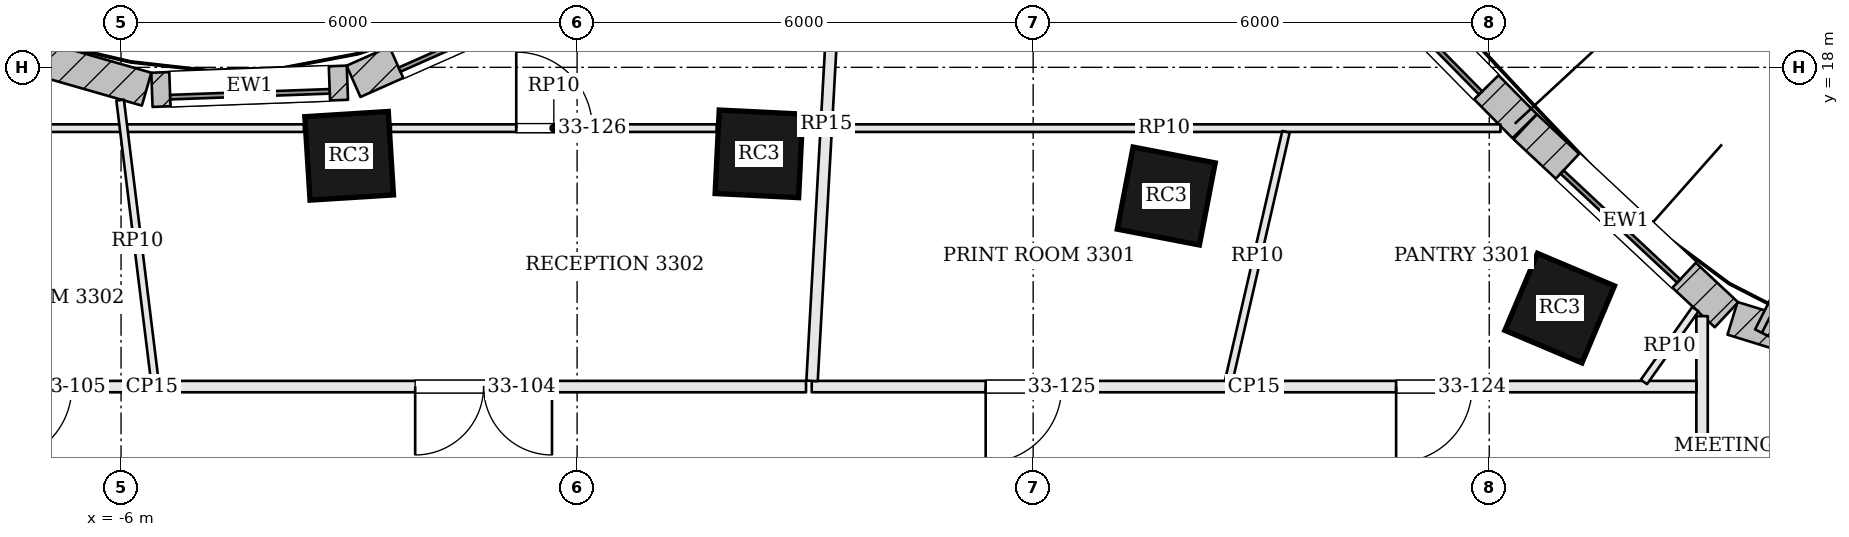
"""IFC4 building model, lengths in metres.
Left out: names, types, materials, properties, quantities, classifications, styles, units other than length and angle.
Written with IfcOpenShell. Run it as: python <this file> out.ifc"""

import sys

from ifc_helpers import new_model, si_unit, direction, frame, frame_2d, origin, origin_2d, place, context, subcontext, project, spatial, rectangle, extrude, element, fill, save


model = new_model("IFC4")
c1 = context("Model", 3, precision=1e-05, world=origin(), true_north=direction((0.0, 1.0)))
c2 = subcontext(c1, "Body", "Model", "MODEL_VIEW")
j1 = project(units=[si_unit("LENGTHUNIT", "METRE"), si_unit("PLANEANGLEUNIT", "RADIAN")], contexts=[c1])
p1 = place(None, origin())
s1 = spatial("IfcSite", under=j1, at=p1, CompositionType="ELEMENT")
p2 = place(p1, origin())
s2 = spatial("IfcBuilding", under=s1, at=p2, CompositionType="ELEMENT")
p3 = place(p2, frame((0.0, 0.0, 138.3)))
s3 = spatial("IfcBuildingStorey", under=s2, at=p3, CompositionType="ELEMENT", Elevation=138.3)
for number, where, z_axis, x_axis in (
    (1, (12.927, 14.832, 0.0), (0.0, 0.0, 1.0), (-0.921, 0.389, 0.0)),
    (2, (7.751, 16.307, 0.0), (0.0, 0.0, 1.0), (-0.982, 0.189, 0.0)),
    (3, (2.392, 16.862, 0.0), (0.0, 0.0, 1.0), (-0.999, 0.049, 0.0)),
    (4, (-2.999, 16.836, 0.0), (0.0, 0.0, 1.0), (-0.998, -0.062, 0.0)),
):
    element("IfcColumn", number, at=place(p3, frame(where, z_axis=z_axis, x_axis=x_axis)), inside=s3, PredefinedType="COLUMN", context=c2, shape_type="SweptSolid", body=[
        extrude(rectangle(XDim=1.1, YDim=1.1, at=origin_2d()), origin(), (0.0, 0.0, 1.0), 3.9),
    ])
p4 = place(p3, frame((18.958, 13.542, 0.0), z_axis=(0.0, 0.0, 1.0), x_axis=(-0.955792437529, 0.294042201668, 0.0)))
e5 = element("IfcWall", 5, at=p4, inside=s3, PredefinedType="SOLIDWALL", context=c2, shape_type="SweptSolid", body=[
    extrude(rectangle(XDim=3.931, YDim=0.45, at=frame_2d((1.965, 0.0))), origin(), (0.0, 0.0, 1.0), 3.7),
])
p5 = place(p4, frame((0.915, 0.0, 0.9)))
e6 = element("IfcOpeningElement", 6, at=p5, cuts=e5, PredefinedType="OPENING", context=c2, shape_type="SweptSolid", body=[
    extrude(rectangle(XDim=2.1, YDim=2.3, at=frame_2d((1.05, 1.15))), frame((0.0, 0.235, 0.0), z_axis=(0.0, -1.0, 0.0), x_axis=(1.0, 0.0, 0.0)), (0.0, 0.0, 1.0), 0.47),
])
p6 = place(p3, frame((15.121, 14.745, 0.0), z_axis=(0.0, 0.0, 1.0), x_axis=(-0.730618259172, 0.68278617397, 0.0)))
e7 = element("IfcWall", 7, at=p6, inside=s3, PredefinedType="SOLIDWALL", context=c2, shape_type="SweptSolid", body=[
    extrude(rectangle(XDim=3.624, YDim=0.45, at=frame_2d((1.812, 0.0))), origin(), (0.0, 0.0, 1.0), 3.7),
])
p7 = place(p6, frame((0.762, 0.0, 0.9)))
e8 = element("IfcOpeningElement", 8, at=p7, cuts=e7, PredefinedType="OPENING", context=c2, shape_type="SweptSolid", body=[
    extrude(rectangle(XDim=2.1, YDim=2.3, at=frame_2d((1.05, 1.15))), frame((0.0, 0.235, 0.0), z_axis=(0.0, -1.0, 0.0), x_axis=(1.0, 0.0, 0.0)), (0.0, 0.0, 1.0), 0.47),
])
p8 = place(p3, frame((12.466, 17.226, 0.0), z_axis=(0.0, 0.0, 1.0), x_axis=(-0.701875966769, 0.712299183821, 0.0)))
e9 = element("IfcWall", 9, at=p8, inside=s3, PredefinedType="SOLIDWALL", context=c2, shape_type="SweptSolid", body=[
    extrude(rectangle(XDim=3.537, YDim=0.45, at=frame_2d((1.769, 0.0))), origin(), (0.0, 0.0, 1.0), 3.7),
])
p9 = place(p8, frame((0.718, 0.0, 0.9)))
e10 = element("IfcOpeningElement", 10, at=p9, cuts=e9, PredefinedType="OPENING", context=c2, shape_type="SweptSolid", body=[
    extrude(rectangle(XDim=2.1, YDim=2.3, at=frame_2d((1.05, 1.15))), frame((0.0, 0.235, 0.0), z_axis=(0.0, -1.0, 0.0), x_axis=(1.0, 0.0, 0.0)), (0.0, 0.0, 1.0), 0.47),
])
p10 = place(p3, frame((0.105, 19.167, 0.0), z_axis=(0.0, 0.0, 1.0), x_axis=(-0.91414046241, -0.405397601109, 0.0)))
e11 = element("IfcWall", 11, at=p10, inside=s3, PredefinedType="SOLIDWALL", context=c2, shape_type="SweptSolid", body=[
    extrude(rectangle(XDim=3.333, YDim=0.45, at=frame_2d((1.667, 0.0))), origin(), (0.0, 0.0, 1.0), 3.7),
])
p11 = place(p10, frame((0.617, 0.0, 0.9)))
e12 = element("IfcOpeningElement", 12, at=p11, cuts=e11, PredefinedType="OPENING", context=c2, shape_type="SweptSolid", body=[
    extrude(rectangle(XDim=2.1, YDim=2.3, at=frame_2d((1.05, 1.15))), frame((0.0, 0.235, 0.0), z_axis=(0.0, -1.0, 0.0), x_axis=(1.0, 0.0, 0.0)), (0.0, 0.0, 1.0), 0.47),
])
p12 = place(p3, frame((-3.022, 17.798, 0.0), z_axis=(0.0, 0.0, 1.0), x_axis=(-0.999339560591, -0.036337895349, 0.0)))
e13 = element("IfcWall", 13, at=p12, inside=s3, PredefinedType="SOLIDWALL", context=c2, shape_type="SweptSolid", body=[
    extrude(rectangle(XDim=2.573, YDim=0.45, at=frame_2d((1.287, 0.0))), origin(), (0.0, 0.0, 1.0), 3.7),
])
p13 = place(p12, frame((0.237, 0.0, 0.9)))
e14 = element("IfcOpeningElement", 14, at=p13, cuts=e13, PredefinedType="OPENING", context=c2, shape_type="SweptSolid", body=[
    extrude(rectangle(XDim=2.1, YDim=2.3, at=frame_2d((1.05, 1.15))), frame((0.0, 0.235, 0.0), z_axis=(0.0, -1.0, 0.0), x_axis=(1.0, 0.0, 0.0)), (0.0, 0.0, 1.0), 0.47),
])
p14 = place(p3, frame((-5.664, 17.713, 0.0), z_axis=(0.0, 0.0, 1.0), x_axis=(-0.961108031684, 0.276172684083, 0.0)))
e15 = element("IfcWall", 15, at=p14, inside=s3, PredefinedType="SOLIDWALL", context=c2, shape_type="SweptSolid", body=[
    extrude(rectangle(XDim=4.686, YDim=0.45, at=frame_2d((2.343, 0.0))), origin(), (0.0, 0.0, 1.0), 3.7),
])
p15 = place(p14, frame((1.443, 0.0, 0.9)))
e16 = element("IfcOpeningElement", 16, at=p15, cuts=e15, PredefinedType="OPENING", context=c2, shape_type="SweptSolid", body=[
    extrude(rectangle(XDim=1.8, YDim=2.3, at=frame_2d((0.9, 1.15))), frame((0.0, 0.235, 0.0), z_axis=(0.0, -1.0, 0.0), x_axis=(1.0, 0.0, 0.0)), (0.0, 0.0, 1.0), 0.47),
])
p16 = place(p3, frame((15.587, 14.507, 0.0), z_axis=(0.0, 0.0, 1.0), x_axis=(0.452117231361, 0.89195852432, 0.0)))
e17 = element("IfcWall", 17, at=p16, inside=s3, PredefinedType="SOLIDWALL", context=c2, shape_type="SweptSolid", body=[
    extrude(rectangle(XDim=1.75, YDim=0.2, at=frame_2d((0.875, 0.0))), origin(), (0.0, 0.0, 1.0), 3.7),
])
p17 = place(p3, frame((14.8, 3.784, 0.0), z_axis=(0.0, 0.0, 1.0), x_axis=(0.0, 1.0, 0.0)))
e18 = element("IfcWall", 18, at=p17, inside=s3, PredefinedType="PARTITIONING", context=c2, shape_type="SweptSolid", body=[
    extrude(rectangle(XDim=10.943, YDim=0.15, at=frame_2d((5.472, 0.0))), origin(), (0.0, 0.0, 1.0), 3.198),
])
p18 = place(p17, frame((1.387, 0.0, 0.0)))
e19 = element("IfcOpeningElement", 19, at=p18, cuts=e18, PredefinedType="OPENING", context=c2, shape_type="SweptSolid", body=[
    extrude(rectangle(XDim=1.8, YDim=2.1, at=frame_2d((0.9, 1.05))), frame((0.0, 0.085, 0.0), z_axis=(0.0, -1.0, 0.0), x_axis=(1.0, 0.0, 0.0)), (0.0, 0.0, 1.0), 0.17),
])
p19 = place(p17, frame((7.199, 0.0, 0.0)))
e20 = element("IfcOpeningElement", 20, at=p19, cuts=e18, PredefinedType="OPENING", context=c2, shape_type="SweptSolid", body=[
    extrude(rectangle(XDim=1.0, YDim=2.4, at=frame_2d((0.5, 1.2))), frame((0.0, 0.085, 0.0), z_axis=(0.0, -1.0, 0.0), x_axis=(1.0, 0.0, 0.0)), (0.0, 0.0, 1.0), 0.17),
])
p20 = place(p3, frame((14.725, 13.8, 0.0), z_axis=(0.0, 0.0, 1.0), x_axis=(-1.0, 0.0, 0.0)))
e21 = element("IfcWall", 21, at=p20, inside=s3, PredefinedType="PARTITIONING", context=c2, shape_type="SweptSolid", body=[
    extrude(rectangle(XDim=11.638, YDim=0.15, at=frame_2d((5.819, 0.0))), origin(), (0.0, 0.0, 1.0), 3.198),
])
p21 = place(p20, frame((2.95, 0.0, 0.0)))
e22 = element("IfcOpeningElement", 22, at=p21, cuts=e21, PredefinedType="OPENING", context=c2, shape_type="SweptSolid", body=[
    extrude(rectangle(XDim=1.0, YDim=2.1, at=frame_2d((0.5, 1.05))), frame((0.0, 0.085, 0.0), z_axis=(0.0, -1.0, 0.0), x_axis=(1.0, 0.0, 0.0)), (0.0, 0.0, 1.0), 0.17),
])
p22 = place(p20, frame((8.35, 0.0, 0.0)))
e23 = element("IfcOpeningElement", 23, at=p22, cuts=e21, PredefinedType="OPENING", context=c2, shape_type="SweptSolid", body=[
    extrude(rectangle(XDim=1.0, YDim=2.1, at=frame_2d((0.5, 1.05))), frame((0.0, 0.085, 0.0), z_axis=(0.0, -1.0, 0.0), x_axis=(1.0, 0.0, 0.0)), (0.0, 0.0, 1.0), 0.17),
])
p23 = place(p3, frame((3.47, 20.638, 0.0), z_axis=(0.0, 0.0, 1.0), x_axis=(-0.056008975247, -0.998430265312, 0.0)))
e24 = element("IfcWall", 24, at=p23, inside=s3, PredefinedType="PARTITIONING", context=c2, shape_type="SweptSolid", body=[
    extrude(rectangle(XDim=6.774, YDim=0.15, at=frame_2d((3.387, 0.0))), origin(), (0.0, 0.0, 1.0), 3.198),
])
p24 = place(p3, frame((3.012, 13.8, 0.0), z_axis=(0.0, 0.0, 1.0), x_axis=(-1.0, 0.0, 0.0)))
e25 = element("IfcWall", 25, at=p24, inside=s3, PredefinedType="PARTITIONING", context=c2, shape_type="SweptSolid", body=[
    extrude(rectangle(XDim=17.812, YDim=0.15, at=frame_2d((8.906, 0.0))), origin(), (0.0, 0.0, 1.0), 3.198),
])
p25 = place(p24, frame((3.342, 0.0, 0.0)))
e26 = element("IfcOpeningElement", 26, at=p25, cuts=e25, PredefinedType="OPENING", context=c2, shape_type="SweptSolid", body=[
    extrude(rectangle(XDim=1.8, YDim=2.1, at=frame_2d((0.9, 1.05))), frame((0.0, 0.085, 0.0), z_axis=(0.0, -1.0, 0.0), x_axis=(1.0, 0.0, 0.0)), (0.0, 0.0, 1.0), 0.17),
])
p26 = place(p24, frame((9.659, 0.0, 0.0)))
e27 = element("IfcOpeningElement", 27, at=p26, cuts=e25, PredefinedType="OPENING", context=c2, shape_type="SweptSolid", body=[
    extrude(rectangle(XDim=1.0, YDim=2.4, at=frame_2d((0.5, 1.2))), frame((0.0, 0.085, 0.0), z_axis=(0.0, -1.0, 0.0), x_axis=(1.0, 0.0, 0.0)), (0.0, 0.0, 1.0), 0.17),
])
p27 = place(p24, frame((14.25, 0.0, 0.0)))
e28 = element("IfcOpeningElement", 28, at=p27, cuts=e25, PredefinedType="OPENING", context=c2, shape_type="SweptSolid", body=[
    extrude(rectangle(XDim=1.0, YDim=2.1, at=frame_2d((0.5, 1.05))), frame((0.0, 0.085, 0.0), z_axis=(0.0, -1.0, 0.0), x_axis=(1.0, 0.0, 0.0)), (0.0, 0.0, 1.0), 0.17),
])
p28 = place(p3, frame((3.298, 17.2, 0.0), z_axis=(0.0, 0.0, 1.0), x_axis=(1.0, 0.0, 0.0)))
e29 = element("IfcWall", 29, at=p28, inside=s3, PredefinedType="PARTITIONING", context=c2, shape_type="SweptSolid", body=[
    extrude(rectangle(XDim=8.85, YDim=0.1, at=frame_2d((4.425, 0.0))), origin(), (0.0, 0.0, 1.0), 3.184),
])
p29 = place(p3, frame((14.035, 13.861, 0.0), z_axis=(0.0, 0.0, 1.0), x_axis=(0.57745118401, 0.816425214019, 0.0)))
e30 = element("IfcWall", 30, at=p29, inside=s3, PredefinedType="PARTITIONING", context=c2, shape_type="SweptSolid", body=[
    extrude(rectangle(XDim=1.173, YDim=0.1, at=frame_2d((0.586, 0.0))), origin(), (0.0, 0.0, 1.0), 3.184),
])
p30 = place(p3, frame((8.573, 13.873, 0.0), z_axis=(0.0, 0.0, 1.0), x_axis=(0.224048430302, 0.974578011695, 0.0)))
e31 = element("IfcWall", 31, at=p30, inside=s3, PredefinedType="PARTITIONING", context=c2, shape_type="SweptSolid", body=[
    extrude(rectangle(XDim=3.364, YDim=0.1, at=frame_2d((1.682, 0.0))), origin(), (0.0, 0.0, 1.0), 3.184),
])
p31 = place(p3, frame((-17.178, 17.2, 0.0), z_axis=(0.0, 0.0, 1.0), x_axis=(1.0, 0.0, 0.0)))
e32 = element("IfcWall", 32, at=p31, inside=s3, PredefinedType="PARTITIONING", context=c2, shape_type="SweptSolid", body=[
    extrude(rectangle(XDim=13.585, YDim=0.1, at=frame_2d((6.792, 0.0))), origin(), (0.0, 0.0, 1.0), 3.184),
])
p32 = place(p31, frame((3.043, 0.0, 0.0)))
e33 = element("IfcOpeningElement", 33, at=p32, cuts=e32, PredefinedType="OPENING", context=c2, shape_type="SweptSolid", body=[
    extrude(rectangle(XDim=0.9, YDim=2.1, at=frame_2d((0.45, 1.05))), frame((0.0, 0.06, 0.0), z_axis=(0.0, -1.0, 0.0), x_axis=(1.0, 0.0, 0.0)), (0.0, 0.0, 1.0), 0.12),
])
p33 = place(p3, frame((-2.451, 17.2, 0.0), z_axis=(0.0, 0.0, 1.0), x_axis=(1.0, 0.0, 0.0)))
e34 = element("IfcWall", 34, at=p33, inside=s3, PredefinedType="PARTITIONING", context=c2, shape_type="SweptSolid", body=[
    extrude(rectangle(XDim=4.289, YDim=0.1, at=frame_2d((2.144, 0.0))), origin(), (0.0, 0.0, 1.0), 3.184),
])
p34 = place(p33, frame((1.65, 0.0, 0.0)))
e35 = element("IfcOpeningElement", 35, at=p34, cuts=e34, PredefinedType="OPENING", context=c2, shape_type="SweptSolid", body=[
    extrude(rectangle(XDim=1.0, YDim=2.1, at=frame_2d((0.5, 1.05))), frame((0.0, 0.06, 0.0), z_axis=(0.0, -1.0, 0.0), x_axis=(1.0, 0.0, 0.0)), (0.0, 0.0, 1.0), 0.12),
])
p35 = place(p3, frame((-5.556, 13.875, 0.0), z_axis=(0.0, 0.0, 1.0), x_axis=(-0.122573624649, 0.99245942312, 0.0)))
e36 = element("IfcWall", 36, at=p35, inside=s3, PredefinedType="PARTITIONING", context=c2, shape_type="SweptSolid", body=[
    extrude(rectangle(XDim=3.723, YDim=0.1, at=frame_2d((1.861, 0.0))), origin(), (0.0, 0.0, 1.0), 3.184),
])
p36 = place(p7, origin())
e37 = element("IfcWindow", 37, at=p36, inside=s3, PartitioningType="SINGLE_PANEL", PredefinedType="WINDOW", context=c2, shape_type="SweptSolid", body=[
    extrude(rectangle(XDim=2.1, YDim=2.3, at=frame_2d((1.05, 1.15))), frame((0.0, 0.135, 0.0), z_axis=(0.0, -1.0, 0.0), x_axis=(1.0, 0.0, 0.0)), (0.0, 0.0, 1.0), 0.06),
])
fill(e8, e37)
p37 = place(p9, origin())
e38 = element("IfcWindow", 38, at=p37, inside=s3, PartitioningType="SINGLE_PANEL", PredefinedType="WINDOW", context=c2, shape_type="SweptSolid", body=[
    extrude(rectangle(XDim=2.1, YDim=2.3, at=frame_2d((1.05, 1.15))), frame((0.0, 0.135, 0.0), z_axis=(0.0, -1.0, 0.0), x_axis=(1.0, 0.0, 0.0)), (0.0, 0.0, 1.0), 0.06),
])
fill(e10, e38)
p38 = place(p11, origin())
e39 = element("IfcWindow", 39, at=p38, inside=s3, PartitioningType="SINGLE_PANEL", PredefinedType="WINDOW", context=c2, shape_type="SweptSolid", body=[
    extrude(rectangle(XDim=2.1, YDim=2.3, at=frame_2d((1.05, 1.15))), frame((0.0, 0.135, 0.0), z_axis=(0.0, -1.0, 0.0), x_axis=(1.0, 0.0, 0.0)), (0.0, 0.0, 1.0), 0.06),
])
fill(e12, e39)
p39 = place(p13, origin())
e40 = element("IfcWindow", 40, at=p39, inside=s3, PartitioningType="SINGLE_PANEL", PredefinedType="WINDOW", context=c2, shape_type="SweptSolid", body=[
    extrude(rectangle(XDim=2.1, YDim=2.3, at=frame_2d((1.05, 1.15))), frame((0.0, 0.135, 0.0), z_axis=(0.0, -1.0, 0.0), x_axis=(1.0, 0.0, 0.0)), (0.0, 0.0, 1.0), 0.06),
])
fill(e14, e40)
p40 = place(p25, origin())
e41 = element("IfcDoor", 41, at=p40, inside=s3, OperationType="DOUBLE_DOOR_SINGLE_SWING", PredefinedType="DOOR", context=c2, shape_type="SweptSolid", body=[
    extrude(rectangle(XDim=1.8, YDim=2.1, at=frame_2d((0.9, 1.05))), frame((0.0, 0.025, 0.0), z_axis=(0.0, -1.0, 0.0), x_axis=(1.0, 0.0, 0.0)), (0.0, 0.0, 1.0), 0.05),
])
fill(e26, e41)
p41 = place(p26, origin())
e42 = element("IfcDoor", 42, at=p41, inside=s3, OperationType="SINGLE_SWING_RIGHT", PredefinedType="DOOR", context=c2, shape_type="SweptSolid", body=[
    extrude(rectangle(XDim=1.0, YDim=2.4, at=frame_2d((0.5, 1.2))), frame((0.0, 0.025, 0.0), z_axis=(0.0, -1.0, 0.0), x_axis=(1.0, 0.0, 0.0)), (0.0, 0.0, 1.0), 0.05),
])
fill(e27, e42)
p42 = place(p21, origin())
e43 = element("IfcDoor", 43, at=p42, inside=s3, OperationType="SINGLE_SWING_RIGHT", PredefinedType="DOOR", context=c2, shape_type="SweptSolid", body=[
    extrude(rectangle(XDim=1.0, YDim=2.1, at=frame_2d((0.5, 1.05))), frame((0.0, 0.025, 0.0), z_axis=(0.0, -1.0, 0.0), x_axis=(1.0, 0.0, 0.0)), (0.0, 0.0, 1.0), 0.05),
])
fill(e22, e43)
p43 = place(p22, origin())
e44 = element("IfcDoor", 44, at=p43, inside=s3, OperationType="SINGLE_SWING_RIGHT", PredefinedType="DOOR", context=c2, shape_type="SweptSolid", body=[
    extrude(rectangle(XDim=1.0, YDim=2.1, at=frame_2d((0.5, 1.05))), frame((0.0, 0.025, 0.0), z_axis=(0.0, -1.0, 0.0), x_axis=(1.0, 0.0, 0.0)), (0.0, 0.0, 1.0), 0.05),
])
fill(e23, e44)
p44 = place(p34, origin())
e45 = element("IfcDoor", 45, at=p44, inside=s3, OperationType="SINGLE_SWING_LEFT", PredefinedType="DOOR", context=c2, shape_type="SweptSolid", body=[
    extrude(rectangle(XDim=1.0, YDim=2.1, at=frame_2d((0.5, 1.05))), frame((0.0, 0.025, 0.0), z_axis=(0.0, -1.0, 0.0), x_axis=(1.0, 0.0, 0.0)), (0.0, 0.0, 1.0), 0.05),
])
fill(e35, e45)
save(model, sys.argv[1])
